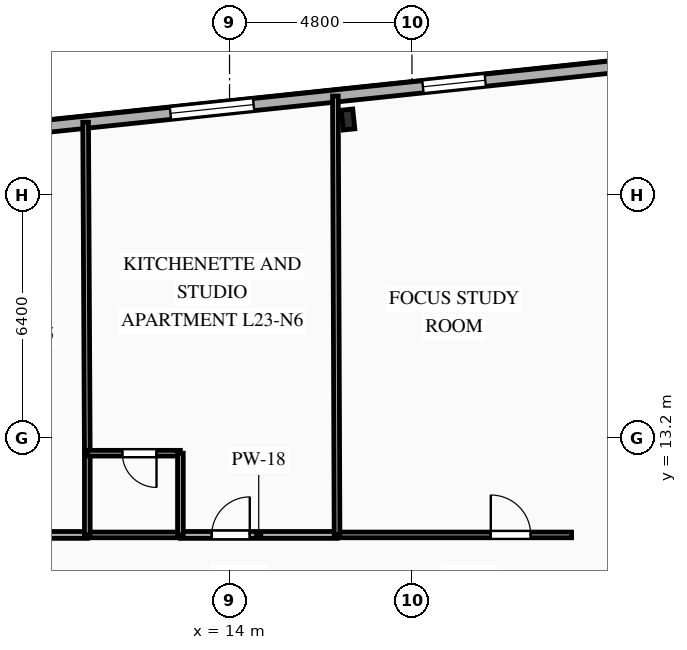
"""IFC4 building model, lengths in metres.
Left out: names, types, materials, properties, quantities, classifications, styles, units other than length and angle.
Written with IfcOpenShell. Run it as: python <this file> out.ifc"""

import sys

from ifc_helpers import new_model, si_unit, direction, frame, frame_2d, origin, origin_2d, place, context, subcontext, project, spatial, rectangle, i_section, extrude, element, fill, save


model = new_model("IFC4")
c1 = context("Model", 3, precision=1e-05, world=origin(), true_north=direction((0.0, 1.0)))
c2 = subcontext(c1, "Body", "Model", "MODEL_VIEW")
j1 = project(units=[si_unit("LENGTHUNIT", "METRE"), si_unit("PLANEANGLEUNIT", "RADIAN")], contexts=[c1])
p1 = place(None, origin())
s1 = spatial("IfcSite", under=j1, at=p1, CompositionType="ELEMENT")
p2 = place(p1, origin())
s2 = spatial("IfcBuilding", under=s1, at=p2, CompositionType="ELEMENT")
p3 = place(p2, frame((0.0, 0.0, 85.7)))
s3 = spatial("IfcBuildingStorey", under=s2, at=p3, CompositionType="ELEMENT", Elevation=85.7)
p4 = place(p3, frame((17.117, 21.58, 0.0), z_axis=(0.0, 0.0, 1.0), x_axis=(0.994521895368, 0.104528463268, 0.0)))
e1 = element("IfcColumn", 1, at=p4, inside=s3, PredefinedType="COLUMN", context=c2, shape_type="SweptSolid", body=[
    extrude(i_section(OverallWidth=0.306, OverallDepth=0.524, WebThickness=0.021, FlangeThickness=0.04, FilletRadius=0.027, at=origin_2d()), origin(), (0.0, 0.0, 1.0), 3.35),
])
p5 = place(p3, frame((-27.107, 17.586, 0.0), z_axis=(0.0, 0.0, 1.0), x_axis=(0.994521628355, 0.104531003701, 0.0)))
e2 = element("IfcWall", 2, at=p5, inside=s3, PredefinedType="SOLIDWALL", context=c2, shape_type="SweptSolid", body=[
    extrude(rectangle(XDim=53.8, YDim=0.32, at=frame_2d((26.9, 0.0))), origin(), (0.0, 0.0, 1.0), 3.045),
])
p6 = place(p5, frame((6.781, 0.0, 0.85)))
e3 = element("IfcOpeningElement", 3, at=p6, cuts=e2, PredefinedType="OPENING", context=c2, shape_type="SweptSolid", body=[
    extrude(rectangle(XDim=1.65, YDim=1.85, at=frame_2d((0.825, 0.925))), frame((0.0, 0.17, 0.0), z_axis=(0.0, -1.0, 0.0), x_axis=(1.0, 0.0, 0.0)), (0.0, 0.0, 1.0), 0.34),
])
p7 = place(p5, frame((14.812, 0.0, 0.85)))
e4 = element("IfcOpeningElement", 4, at=p7, cuts=e2, PredefinedType="OPENING", context=c2, shape_type="SweptSolid", body=[
    extrude(rectangle(XDim=1.6, YDim=1.85, at=frame_2d((0.8, 0.925))), frame((0.0, 0.17, 0.0), z_axis=(0.0, -1.0, 0.0), x_axis=(1.0, 0.0, 0.0)), (0.0, 0.0, 1.0), 0.34),
])
p8 = place(p5, frame((19.956, 0.0, 0.85)))
e5 = element("IfcOpeningElement", 5, at=p8, cuts=e2, PredefinedType="OPENING", context=c2, shape_type="SweptSolid", body=[
    extrude(rectangle(XDim=2.2, YDim=1.85, at=frame_2d((1.1, 0.925))), frame((0.0, 0.17, 0.0), z_axis=(0.0, -1.0, 0.0), x_axis=(1.0, 0.0, 0.0)), (0.0, 0.0, 1.0), 0.34),
])
p9 = place(p5, frame((26.561, 0.0, 0.85)))
e6 = element("IfcOpeningElement", 6, at=p9, cuts=e2, PredefinedType="OPENING", context=c2, shape_type="SweptSolid", body=[
    extrude(rectangle(XDim=2.2, YDim=1.85, at=frame_2d((1.1, 0.925))), frame((0.0, 0.17, 0.0), z_axis=(0.0, -1.0, 0.0), x_axis=(1.0, 0.0, 0.0)), (0.0, 0.0, 1.0), 0.34),
])
p10 = place(p5, frame((33.166, 0.0, 0.85)))
e7 = element("IfcOpeningElement", 7, at=p10, cuts=e2, PredefinedType="OPENING", context=c2, shape_type="SweptSolid", body=[
    extrude(rectangle(XDim=2.2, YDim=1.85, at=frame_2d((1.1, 0.925))), frame((0.0, 0.17, 0.0), z_axis=(0.0, -1.0, 0.0), x_axis=(1.0, 0.0, 0.0)), (0.0, 0.0, 1.0), 0.34),
])
p11 = place(p5, frame((39.771, 0.0, 0.85)))
e8 = element("IfcOpeningElement", 8, at=p11, cuts=e2, PredefinedType="OPENING", context=c2, shape_type="SweptSolid", body=[
    extrude(rectangle(XDim=2.2, YDim=1.85, at=frame_2d((1.1, 0.925))), frame((0.0, 0.17, 0.0), z_axis=(0.0, -1.0, 0.0), x_axis=(1.0, 0.0, 0.0)), (0.0, 0.0, 1.0), 0.34),
])
p12 = place(p5, frame((46.45, 0.0, 0.85)))
e9 = element("IfcOpeningElement", 9, at=p12, cuts=e2, PredefinedType="OPENING", context=c2, shape_type="SweptSolid", body=[
    extrude(rectangle(XDim=1.65, YDim=1.85, at=frame_2d((0.825, 0.925))), frame((0.0, 0.17, 0.0), z_axis=(0.0, -1.0, 0.0), x_axis=(1.0, 0.0, 0.0)), (0.0, 0.0, 1.0), 0.34),
])
p13 = place(p3, frame((6.136, 10.65, 0.0), z_axis=(0.0, 0.0, 1.0), x_axis=(1.0, 0.0, 0.0)))
e10 = element("IfcWall", 10, at=p13, inside=s3, PredefinedType="PARTITIONING", context=c2, shape_type="SweptSolid", body=[
    extrude(rectangle(XDim=4.121, YDim=0.18, at=frame_2d((2.061, 0.0))), origin(), (0.0, 0.0, 1.0), 3.045),
])
p14 = place(p13, frame((0.825, 0.0, 0.0)))
e11 = element("IfcOpeningElement", 11, at=p14, cuts=e10, PredefinedType="OPENING", context=c2, shape_type="SweptSolid", body=[
    extrude(rectangle(XDim=1.0, YDim=2.15, at=frame_2d((0.5, 1.075))), frame((0.0, 0.1, 0.0), z_axis=(0.0, -1.0, 0.0), x_axis=(1.0, 0.0, 0.0)), (0.0, 0.0, 1.0), 0.2),
])
p15 = place(p3, frame((12.707, 10.65, 0.0), z_axis=(0.0, 0.0, 1.0), x_axis=(1.0, 0.0, 0.0)))
e12 = element("IfcWall", 12, at=p15, inside=s3, PredefinedType="PARTITIONING", context=c2, shape_type="SweptSolid", body=[
    extrude(rectangle(XDim=4.122, YDim=0.18, at=frame_2d((2.061, 0.0))), origin(), (0.0, 0.0, 1.0), 3.045),
])
p16 = place(p15, frame((0.825, 0.0, 0.0)))
e13 = element("IfcOpeningElement", 13, at=p16, cuts=e12, PredefinedType="OPENING", context=c2, shape_type="SweptSolid", body=[
    extrude(rectangle(XDim=1.0, YDim=2.15, at=frame_2d((0.5, 1.075))), frame((0.0, 0.1, 0.0), z_axis=(0.0, -1.0, 0.0), x_axis=(1.0, 0.0, 0.0)), (0.0, 0.0, 1.0), 0.2),
])
p17 = place(p3, frame((10.257, 10.65, 0.0), z_axis=(0.0, 0.0, 1.0), x_axis=(1.0, 0.0, 0.0)))
e14 = element("IfcWall", 14, at=p17, inside=s3, PredefinedType="PLUMBINGWALL", context=c2, shape_type="SweptSolid", body=[
    extrude(rectangle(XDim=2.45, YDim=0.15, at=frame_2d((1.225, 0.0))), origin(), (0.0, 0.0, 1.0), 3.045),
])
p18 = place(p3, frame((16.829, 10.65, 0.0), z_axis=(0.0, 0.0, 1.0), x_axis=(1.0, 0.0, 0.0)))
e15 = element("IfcWall", 15, at=p18, inside=s3, PredefinedType="PARTITIONING", context=c2, shape_type="SweptSolid", body=[
    extrude(rectangle(XDim=6.171, YDim=0.15, at=frame_2d((3.085, 0.0))), origin(), (0.0, 0.0, 1.0), 3.045),
])
p19 = place(p18, frame((4.046, 0.0, 0.0)))
e16 = element("IfcOpeningElement", 16, at=p19, cuts=e15, PredefinedType="OPENING", context=c2, shape_type="SweptSolid", body=[
    extrude(rectangle(XDim=1.05, YDim=2.15, at=frame_2d((0.525, 1.075))), frame((0.0, 0.085, 0.0), z_axis=(0.0, -1.0, 0.0), x_axis=(1.0, 0.0, 0.0)), (0.0, 0.0, 1.0), 0.17),
])
p20 = place(p3, frame((10.213, 21.508, 0.0), z_axis=(0.0, 0.0, 1.0), x_axis=(0.005046334579, -0.999987267173, 0.0)))
e17 = element("IfcWall", 17, at=p20, inside=s3, PredefinedType="PARTITIONING", context=c2, shape_type="SweptSolid", body=[
    extrude(rectangle(XDim=8.708, YDim=0.15, at=frame_2d((4.354, 0.0))), origin(), (0.0, 0.0, 1.0), 3.045),
])
p21 = place(p3, frame((10.257, 12.8, 0.0), z_axis=(0.0, 0.0, 1.0), x_axis=(0.0, -1.0, 0.0)))
e18 = element("IfcWall", 18, at=p21, inside=s3, PredefinedType="PLUMBINGWALL", context=c2, shape_type="SweptSolid", body=[
    extrude(rectangle(XDim=2.15, YDim=0.15, at=frame_2d((1.075, 0.0))), origin(), (0.0, 0.0, 1.0), 3.045),
])
p22 = place(p3, frame((12.707, 12.8, 0.0), z_axis=(0.0, 0.0, 1.0), x_axis=(-1.0, 0.0, 0.0)))
e19 = element("IfcWall", 19, at=p22, inside=s3, PredefinedType="PLUMBINGWALL", context=c2, shape_type="SweptSolid", body=[
    extrude(rectangle(XDim=2.45, YDim=0.15, at=frame_2d((1.225, 0.0))), origin(), (0.0, 0.0, 1.0), 3.045),
])
p23 = place(p22, frame((0.629, 0.0, 0.0)))
e20 = element("IfcOpeningElement", 20, at=p23, cuts=e19, PredefinedType="OPENING", context=c2, shape_type="SweptSolid", body=[
    extrude(rectangle(XDim=0.9, YDim=2.1, at=frame_2d((0.45, 1.05))), frame((0.0, 0.085, 0.0), z_axis=(0.0, -1.0, 0.0), x_axis=(1.0, 0.0, 0.0)), (0.0, 0.0, 1.0), 0.17),
])
p24 = place(p3, frame((12.707, 10.65, 0.0), z_axis=(0.0, 0.0, 1.0), x_axis=(0.0, 1.0, 0.0)))
e21 = element("IfcWall", 21, at=p24, inside=s3, PredefinedType="PLUMBINGWALL", context=c2, shape_type="SweptSolid", body=[
    extrude(rectangle(XDim=2.15, YDim=0.15, at=frame_2d((1.075, 0.0))), origin(), (0.0, 0.0, 1.0), 3.045),
])
p25 = place(p3, frame((16.785, 22.199, 0.0), z_axis=(0.0, 0.0, 1.0), x_axis=(0.003805067053, -0.999992760706, 0.0)))
e22 = element("IfcWall", 22, at=p25, inside=s3, PredefinedType="PARTITIONING", context=c2, shape_type="SweptSolid", body=[
    extrude(rectangle(XDim=11.549, YDim=0.15, at=frame_2d((5.774, 0.0))), origin(), (0.0, 0.0, 1.0), 3.045),
])
p26 = place(p11, origin())
e23 = element("IfcWindow", 23, at=p26, inside=s3, PartitioningType="SINGLE_PANEL", PredefinedType="WINDOW", context=c2, shape_type="SweptSolid", body=[
    extrude(rectangle(XDim=2.2, YDim=1.85, at=frame_2d((1.1, 0.925))), frame((0.0, 0.03, 0.0), z_axis=(0.0, -1.0, 0.0), x_axis=(1.0, 0.0, 0.0)), (0.0, 0.0, 1.0), 0.06),
])
fill(e8, e23)
p27 = place(p12, origin())
e24 = element("IfcWindow", 24, at=p27, inside=s3, PartitioningType="SINGLE_PANEL", PredefinedType="WINDOW", context=c2, shape_type="SweptSolid", body=[
    extrude(rectangle(XDim=1.65, YDim=1.85, at=frame_2d((0.825, 0.925))), frame((0.0, 0.03, 0.0), z_axis=(0.0, -1.0, 0.0), x_axis=(1.0, 0.0, 0.0)), (0.0, 0.0, 1.0), 0.06),
])
fill(e9, e24)
p28 = place(p16, origin())
e25 = element("IfcDoor", 25, at=p28, inside=s3, OperationType="SINGLE_SWING_RIGHT", PredefinedType="DOOR", context=c2, shape_type="SweptSolid", body=[
    extrude(rectangle(XDim=1.0, YDim=2.15, at=frame_2d((0.5, 1.075))), frame((0.0, 0.025, 0.0), z_axis=(0.0, -1.0, 0.0), x_axis=(1.0, 0.0, 0.0)), (0.0, 0.0, 1.0), 0.05),
])
fill(e13, e25)
p29 = place(p19, origin())
e26 = element("IfcDoor", 26, at=p29, inside=s3, OperationType="SINGLE_SWING_LEFT", PredefinedType="DOOR", context=c2, shape_type="SweptSolid", body=[
    extrude(rectangle(XDim=1.05, YDim=2.15, at=frame_2d((0.525, 1.075))), frame((0.0, 0.025, 0.0), z_axis=(0.0, -1.0, 0.0), x_axis=(1.0, 0.0, 0.0)), (0.0, 0.0, 1.0), 0.05),
])
fill(e16, e26)
p30 = place(p23, origin())
e27 = element("IfcDoor", 27, at=p30, inside=s3, OperationType="SINGLE_SWING_LEFT", PredefinedType="DOOR", context=c2, shape_type="SweptSolid", body=[
    extrude(rectangle(XDim=0.9, YDim=2.1, at=frame_2d((0.45, 1.05))), frame((0.0, 0.025, 0.0), z_axis=(0.0, -1.0, 0.0), x_axis=(1.0, 0.0, 0.0)), (0.0, 0.0, 1.0), 0.05),
])
fill(e20, e27)
save(model, sys.argv[1])
